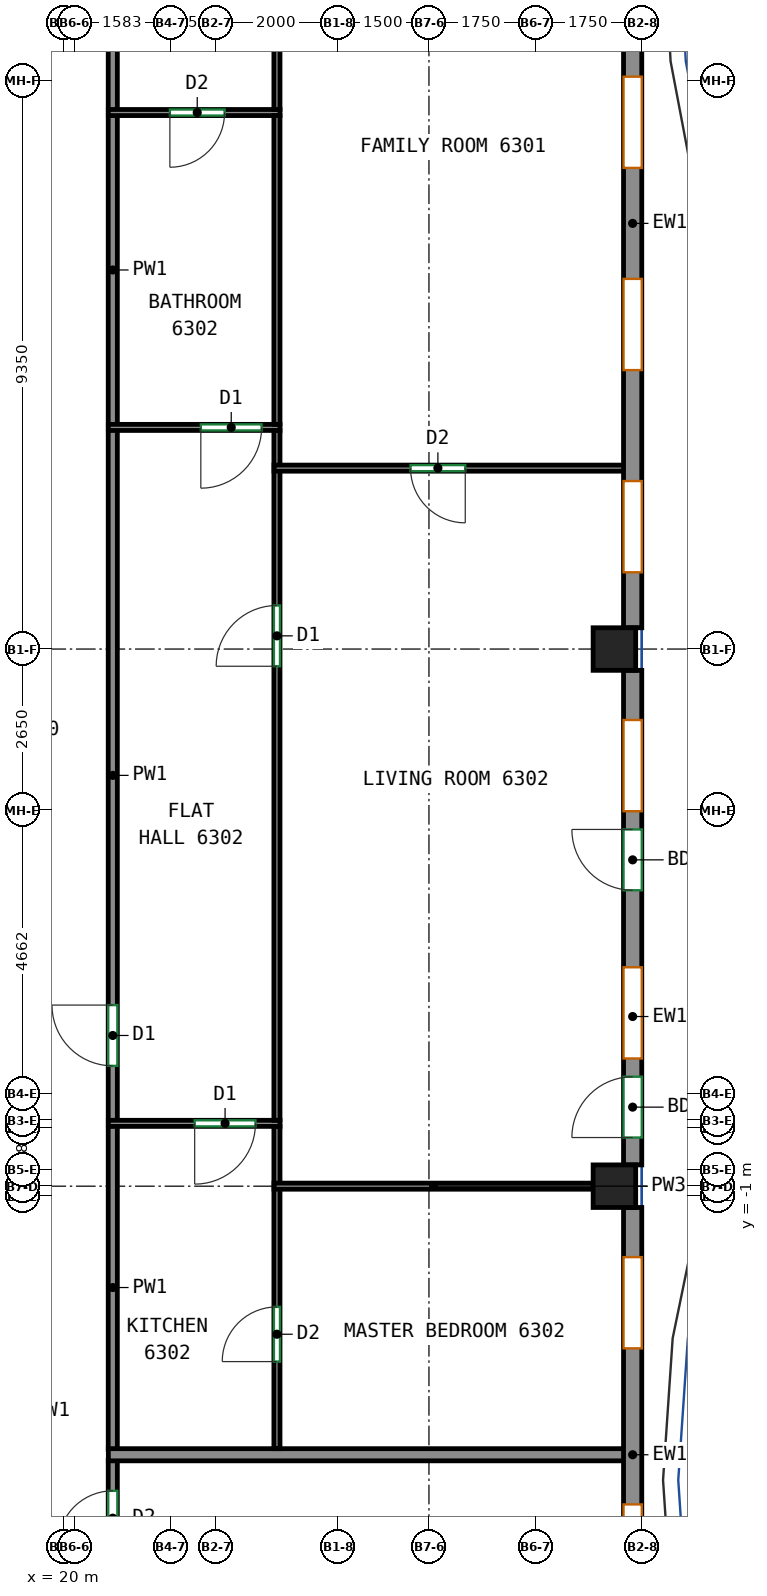
"""IFC4 building model, lengths in metres.
Left out: names, types, materials, properties, quantities, classifications, styles, units other than length and angle.
Written with IfcOpenShell. Run it as: python <this file> out.ifc"""

import sys

from ifc_helpers import new_model, si_unit, direction, frame, frame_2d, origin, origin_2d, place, context, subcontext, project, spatial, rectangle, extrude, source, transform, mapped, element, fill, save


model = new_model("IFC4")
c1 = context("Model", 3, precision=1e-05, world=origin(), true_north=direction((0.0, 1.0)))
c2 = subcontext(c1, "Body", "Model", "MODEL_VIEW")
j1 = project(units=[si_unit("LENGTHUNIT", "METRE"), si_unit("PLANEANGLEUNIT", "RADIAN")], contexts=[c1])
p1 = place(None, origin())
s1 = spatial("IfcSite", under=j1, at=p1, CompositionType="ELEMENT")
p2 = place(p1, origin())
s2 = spatial("IfcBuilding", under=s1, at=p2, CompositionType="ELEMENT")
p3 = place(p2, frame((0.0, 0.0, 259.4)))
s3 = spatial("IfcBuildingStorey", under=s2, at=p3, CompositionType="ELEMENT", Elevation=259.4)
m1 = source(origin(), c2, "Body", "SweptSolid", [
    extrude(rectangle(XDim=0.7, YDim=0.7, at=origin_2d()), origin(), (0.0, 0.0, 1.0), 3.0),
])
for number, where, z_axis, x_axis in (
    (1, (29.05, -0.833, 0.0), (0.0, 0.0, 1.0), (1.0, 0.0, 0.0)),
    (2, (29.05, 8.0, 0.0), (0.0, 0.0, 1.0), (1.0, 0.0, 0.0)),
):
    element("IfcColumn", number, at=place(p3, frame(where, z_axis=z_axis, x_axis=x_axis)), inside=s3, PredefinedType="COLUMN", context=c2, shape_type="MappedRepresentation", body=[
        mapped(m1, transform((0.0, 0.0, 0.0))),
    ])
m2 = source(origin(), c2, "Body", "SweptSolid", [
    extrude(rectangle(XDim=8.133, YDim=0.3, at=frame_2d((4.067, 0.0))), origin(), (0.0, 0.0, 1.0), 3.0),
])
p4 = place(p3, frame((29.35, -9.317, 0.0), z_axis=(0.0, 0.0, 1.0), x_axis=(0.0, 1.0, 0.0)))
e3 = element("IfcWall", 3, at=p4, inside=s3, PredefinedType="SOLIDWALL", context=c2, shape_type="MappedRepresentation", body=[
    mapped(m2, transform((0.0, 0.0, 0.0))),
])
p5 = place(p4, frame((1.75, 0.0, 0.8)))
e4 = element("IfcOpeningElement", 4, at=p5, cuts=e3, PredefinedType="OPENING", context=c2, shape_type="SweptSolid", body=[
    extrude(rectangle(XDim=1.5, YDim=2.05, at=frame_2d((0.75, 1.025))), frame((0.0, 0.16, 0.0), z_axis=(0.0, -1.0, 0.0), x_axis=(1.0, 0.0, 0.0)), (0.0, 0.0, 1.0), 0.32),
])
p6 = place(p4, frame((5.817, 0.0, 0.8)))
e5 = element("IfcOpeningElement", 5, at=p6, cuts=e3, PredefinedType="OPENING", context=c2, shape_type="SweptSolid", body=[
    extrude(rectangle(XDim=1.5, YDim=2.05, at=frame_2d((0.75, 1.025))), frame((0.0, 0.16, 0.0), z_axis=(0.0, -1.0, 0.0), x_axis=(1.0, 0.0, 0.0)), (0.0, 0.0, 1.0), 0.32),
])
p7 = place(p3, frame((29.35, -0.483, 0.0), z_axis=(0.0, 0.0, 1.0), x_axis=(0.0, 1.0, 0.0)))
e6 = element("IfcWall", 6, at=p7, inside=s3, PredefinedType="SOLIDWALL", context=c2, shape_type="MappedRepresentation", body=[
    mapped(m2, transform((0.0, 0.0, 0.0))),
])
p8 = place(p7, frame((1.75, 0.0, 0.8)))
e7 = element("IfcOpeningElement", 7, at=p8, cuts=e6, PredefinedType="OPENING", context=c2, shape_type="SweptSolid", body=[
    extrude(rectangle(XDim=1.5, YDim=2.05, at=frame_2d((0.75, 1.025))), frame((0.0, 0.16, 0.0), z_axis=(0.0, -1.0, 0.0), x_axis=(1.0, 0.0, 0.0)), (0.0, 0.0, 1.0), 0.32),
])
p9 = place(p7, frame((0.45, 0.0, 0.0)))
e8 = element("IfcOpeningElement", 8, at=p9, cuts=e6, PredefinedType="OPENING", context=c2, shape_type="SweptSolid", body=[
    extrude(rectangle(XDim=1.0, YDim=2.1, at=frame_2d((0.5, 1.05))), frame((0.0, 0.16, 0.0), z_axis=(0.0, -1.0, 0.0), x_axis=(1.0, 0.0, 0.0)), (0.0, 0.0, 1.0), 0.32),
])
p10 = place(p7, frame((5.817, 0.0, 0.8)))
e9 = element("IfcOpeningElement", 9, at=p10, cuts=e6, PredefinedType="OPENING", context=c2, shape_type="SweptSolid", body=[
    extrude(rectangle(XDim=1.5, YDim=2.05, at=frame_2d((0.75, 1.025))), frame((0.0, 0.16, 0.0), z_axis=(0.0, -1.0, 0.0), x_axis=(1.0, 0.0, 0.0)), (0.0, 0.0, 1.0), 0.32),
])
p11 = place(p7, frame((4.517, 0.0, 0.0)))
e10 = element("IfcOpeningElement", 10, at=p11, cuts=e6, PredefinedType="OPENING", context=c2, shape_type="SweptSolid", body=[
    extrude(rectangle(XDim=1.0, YDim=2.1, at=frame_2d((0.5, 1.05))), frame((0.0, 0.16, 0.0), z_axis=(0.0, -1.0, 0.0), x_axis=(1.0, 0.0, 0.0)), (0.0, 0.0, 1.0), 0.32),
])
m3 = source(origin(), c2, "Body", "SweptSolid", [
    extrude(rectangle(XDim=13.3, YDim=0.3, at=frame_2d((6.65, 0.0))), origin(), (0.0, 0.0, 1.0), 3.0),
])
p12 = place(p3, frame((29.35, 8.35, 0.0), z_axis=(0.0, 0.0, 1.0), x_axis=(0.0, 1.0, 0.0)))
e11 = element("IfcWall", 11, at=p12, inside=s3, PredefinedType="SOLIDWALL", context=c2, shape_type="MappedRepresentation", body=[
    mapped(m3, transform((0.0, 0.0, 0.0))),
])
p13 = place(p12, frame((0.913, 0.0, 0.8)))
e12 = element("IfcOpeningElement", 12, at=p13, cuts=e11, PredefinedType="OPENING", context=c2, shape_type="SweptSolid", body=[
    extrude(rectangle(XDim=1.5, YDim=2.05, at=frame_2d((0.75, 1.025))), frame((0.0, 0.16, 0.0), z_axis=(0.0, -1.0, 0.0), x_axis=(1.0, 0.0, 0.0)), (0.0, 0.0, 1.0), 0.32),
])
p14 = place(p12, frame((4.238, 0.0, 0.8)))
e13 = element("IfcOpeningElement", 13, at=p14, cuts=e11, PredefinedType="OPENING", context=c2, shape_type="SweptSolid", body=[
    extrude(rectangle(XDim=1.5, YDim=2.05, at=frame_2d((0.75, 1.025))), frame((0.0, 0.16, 0.0), z_axis=(0.0, -1.0, 0.0), x_axis=(1.0, 0.0, 0.0)), (0.0, 0.0, 1.0), 0.32),
])
p15 = place(p12, frame((7.562, 0.0, 0.8)))
e14 = element("IfcOpeningElement", 14, at=p15, cuts=e11, PredefinedType="OPENING", context=c2, shape_type="SweptSolid", body=[
    extrude(rectangle(XDim=1.5, YDim=2.05, at=frame_2d((0.75, 1.025))), frame((0.0, 0.16, 0.0), z_axis=(0.0, -1.0, 0.0), x_axis=(1.0, 0.0, 0.0)), (0.0, 0.0, 1.0), 0.32),
])
p16 = place(p12, frame((10.887, 0.0, 0.8)))
e15 = element("IfcOpeningElement", 15, at=p16, cuts=e11, PredefinedType="OPENING", context=c2, shape_type="SweptSolid", body=[
    extrude(rectangle(XDim=1.5, YDim=2.05, at=frame_2d((0.75, 1.025))), frame((0.0, 0.16, 0.0), z_axis=(0.0, -1.0, 0.0), x_axis=(1.0, 0.0, 0.0)), (0.0, 0.0, 1.0), 0.32),
])
p17 = place(p3, frame((20.8, -7.75, 0.0), z_axis=(0.0, 0.0, 1.0), x_axis=(0.0, 1.0, 0.0)))
e16 = element("IfcWall", 16, at=p17, inside=s3, PredefinedType="PARTITIONING", context=c2, shape_type="SweptSolid", body=[
    extrude(rectangle(XDim=2.41, YDim=0.15, at=frame_2d((1.205, 0.0))), origin(), (0.0, 0.0, 1.0), 3.0),
])
p18 = place(p17, frame((1.007, 0.0, 0.0)))
e17 = element("IfcOpeningElement", 17, at=p18, cuts=e16, PredefinedType="OPENING", context=c2, shape_type="SweptSolid", body=[
    extrude(rectangle(XDim=0.9, YDim=2.1, at=frame_2d((0.45, 1.05))), frame((0.0, 0.085, 0.0), z_axis=(0.0, -1.0, 0.0), x_axis=(1.0, 0.0, 0.0)), (0.0, 0.0, 1.0), 0.17),
])
p19 = place(p3, frame((20.8, -5.16, 0.0), z_axis=(0.0, 0.0, 1.0), x_axis=(0.0, 1.0, 0.0)))
e18 = element("IfcWall", 18, at=p19, inside=s3, PredefinedType="PARTITIONING", context=c2, shape_type="SweptSolid", body=[
    extrude(rectangle(XDim=5.32, YDim=0.15, at=frame_2d((2.66, 0.0))), origin(), (0.0, 0.0, 1.0), 3.0),
])
p20 = place(p3, frame((20.8, 0.24, 0.0), z_axis=(0.0, 0.0, 1.0), x_axis=(0.0, 1.0, 0.0)))
e19 = element("IfcWall", 19, at=p20, inside=s3, PredefinedType="PARTITIONING", context=c2, shape_type="SweptSolid", body=[
    extrude(rectangle(XDim=11.365, YDim=0.15, at=frame_2d((5.683, 0.0))), origin(), (0.0, 0.0, 1.0), 3.0),
])
p21 = place(p20, frame((0.905, 0.0, 0.0)))
e20 = element("IfcOpeningElement", 20, at=p21, cuts=e19, PredefinedType="OPENING", context=c2, shape_type="SweptSolid", body=[
    extrude(rectangle(XDim=1.0, YDim=2.1, at=frame_2d((0.5, 1.05))), frame((0.0, 0.085, 0.0), z_axis=(0.0, -1.0, 0.0), x_axis=(1.0, 0.0, 0.0)), (0.0, 0.0, 1.0), 0.17),
])
p22 = place(p3, frame((20.8, 11.685, 0.0), z_axis=(0.0, 0.0, 1.0), x_axis=(0.0, 1.0, 0.0)))
e21 = element("IfcWall", 21, at=p22, inside=s3, PredefinedType="PARTITIONING", context=c2, shape_type="SweptSolid", body=[
    extrude(rectangle(XDim=5.098, YDim=0.15, at=frame_2d((2.549, 0.0))), origin(), (0.0, 0.0, 1.0), 3.0),
])
p23 = place(p3, frame((20.8, 16.863, 0.0), z_axis=(0.0, 0.0, 1.0), x_axis=(0.0, 1.0, 0.0)))
e22 = element("IfcWall", 22, at=p23, inside=s3, PredefinedType="PARTITIONING", context=c2, shape_type="SweptSolid", body=[
    extrude(rectangle(XDim=5.047, YDim=0.15, at=frame_2d((2.523, 0.0))), origin(), (0.0, 0.0, 1.0), 3.0),
])
p24 = place(p3, frame((20.727, -5.25, 0.0), z_axis=(0.0, 0.0, 1.0), x_axis=(1.0, 0.0, 0.0)))
e23 = element("IfcWall", 23, at=p24, inside=s3, PredefinedType="PARTITIONING", context=c2, shape_type="SweptSolid", body=[
    extrude(rectangle(XDim=8.523, YDim=0.2, at=frame_2d((4.261, 0.0))), origin(), (0.0, 0.0, 1.0), 3.0),
])
p25 = place(p3, frame((23.55, 0.2, 0.0), z_axis=(0.0, 0.0, 1.0), x_axis=(-1.0, 0.0, 0.0)))
e24 = element("IfcWall", 24, at=p25, inside=s3, PredefinedType="PARTITIONING", context=c2, shape_type="SweptSolid", body=[
    extrude(rectangle(XDim=2.823, YDim=0.1, at=frame_2d((1.412, 0.0))), origin(), (0.0, 0.0, 1.0), 3.0),
])
p26 = place(p25, frame((0.403, 0.0, 0.0)))
e25 = element("IfcOpeningElement", 25, at=p26, cuts=e24, PredefinedType="OPENING", context=c2, shape_type="SweptSolid", body=[
    extrude(rectangle(XDim=1.0, YDim=2.1, at=frame_2d((0.5, 1.05))), frame((0.0, 0.06, 0.0), z_axis=(0.0, -1.0, 0.0), x_axis=(1.0, 0.0, 0.0)), (0.0, 0.0, 1.0), 0.12),
])
p27 = place(p3, frame((23.5, -5.15, 0.0), z_axis=(0.0, 0.0, 1.0), x_axis=(0.0, 1.0, 0.0)))
e26 = element("IfcWall", 26, at=p27, inside=s3, PredefinedType="PARTITIONING", context=c2, shape_type="SweptSolid", body=[
    extrude(rectangle(XDim=4.277, YDim=0.1, at=frame_2d((2.138, 0.0))), origin(), (0.0, 0.0, 1.0), 3.0),
])
p28 = place(p27, frame((1.432, 0.0, 0.0)))
e27 = element("IfcOpeningElement", 27, at=p28, cuts=e26, PredefinedType="OPENING", context=c2, shape_type="SweptSolid", body=[
    extrude(rectangle(XDim=0.9, YDim=2.1, at=frame_2d((0.45, 1.05))), frame((0.0, 0.06, 0.0), z_axis=(0.0, -1.0, 0.0), x_axis=(1.0, 0.0, 0.0)), (0.0, 0.0, 1.0), 0.12),
])
p29 = place(p3, frame((23.5, -0.793, 0.0), z_axis=(0.0, 0.0, 1.0), x_axis=(0.0, 1.0, 0.0)))
e28 = element("IfcWall", 28, at=p29, inside=s3, PredefinedType="PARTITIONING", context=c2, shape_type="SweptSolid", body=[
    extrude(rectangle(XDim=0.943, YDim=0.1, at=frame_2d((0.471, 0.0))), origin(), (0.0, 0.0, 1.0), 3.0),
])
p30 = place(p3, frame((23.55, 11.645, 0.0), z_axis=(0.0, 0.0, 1.0), x_axis=(-1.0, 0.0, 0.0)))
e29 = element("IfcWall", 29, at=p30, inside=s3, PredefinedType="PARTITIONING", context=c2, shape_type="SweptSolid", body=[
    extrude(rectangle(XDim=2.823, YDim=0.1, at=frame_2d((1.412, 0.0))), origin(), (0.0, 0.0, 1.0), 3.0),
])
p31 = place(p30, frame((0.302, 0.0, 0.0)))
e30 = element("IfcOpeningElement", 30, at=p31, cuts=e29, PredefinedType="OPENING", context=c2, shape_type="SweptSolid", body=[
    extrude(rectangle(XDim=1.0, YDim=2.1, at=frame_2d((0.5, 1.05))), frame((0.0, 0.06, 0.0), z_axis=(0.0, -1.0, 0.0), x_axis=(1.0, 0.0, 0.0)), (0.0, 0.0, 1.0), 0.12),
])
p32 = place(p3, frame((23.5, 0.25, 0.0), z_axis=(0.0, 0.0, 1.0), x_axis=(0.0, 1.0, 0.0)))
e31 = element("IfcWall", 31, at=p32, inside=s3, PredefinedType="PARTITIONING", context=c2, shape_type="SweptSolid", body=[
    extrude(rectangle(XDim=10.685, YDim=0.1, at=frame_2d((5.343, 0.0))), origin(), (0.0, 0.0, 1.0), 3.0),
])
p33 = place(p32, frame((7.467, 0.0, 0.0)))
e32 = element("IfcOpeningElement", 32, at=p33, cuts=e31, PredefinedType="OPENING", context=c2, shape_type="SweptSolid", body=[
    extrude(rectangle(XDim=1.0, YDim=2.1, at=frame_2d((0.5, 1.05))), frame((0.0, 0.06, 0.0), z_axis=(0.0, -1.0, 0.0), x_axis=(1.0, 0.0, 0.0)), (0.0, 0.0, 1.0), 0.12),
])
p34 = place(p3, frame((23.5, 11.015, 0.0), z_axis=(0.0, 0.0, 1.0), x_axis=(0.0, 1.0, 0.0)))
e33 = element("IfcWall", 33, at=p34, inside=s3, PredefinedType="PARTITIONING", context=c2, shape_type="SweptSolid", body=[
    extrude(rectangle(XDim=0.58, YDim=0.1, at=frame_2d((0.29, 0.0))), origin(), (0.0, 0.0, 1.0), 3.0),
])
p35 = place(p3, frame((23.55, 16.823, 0.0), z_axis=(0.0, 0.0, 1.0), x_axis=(-1.0, 0.0, 0.0)))
e34 = element("IfcWall", 34, at=p35, inside=s3, PredefinedType="PARTITIONING", context=c2, shape_type="SweptSolid", body=[
    extrude(rectangle(XDim=2.823, YDim=0.1, at=frame_2d((1.412, 0.0))), origin(), (0.0, 0.0, 1.0), 3.0),
])
p36 = place(p35, frame((0.911, 0.0, 0.0)))
e35 = element("IfcOpeningElement", 35, at=p36, cuts=e34, PredefinedType="OPENING", context=c2, shape_type="SweptSolid", body=[
    extrude(rectangle(XDim=0.9, YDim=2.1, at=frame_2d((0.45, 1.05))), frame((0.0, 0.06, 0.0), z_axis=(0.0, -1.0, 0.0), x_axis=(1.0, 0.0, 0.0)), (0.0, 0.0, 1.0), 0.12),
])
p37 = place(p3, frame((23.5, 11.695, 0.0), z_axis=(0.0, 0.0, 1.0), x_axis=(0.0, 1.0, 0.0)))
e36 = element("IfcWall", 36, at=p37, inside=s3, PredefinedType="PARTITIONING", context=c2, shape_type="SweptSolid", body=[
    extrude(rectangle(XDim=5.078, YDim=0.1, at=frame_2d((2.539, 0.0))), origin(), (0.0, 0.0, 1.0), 3.0),
])
p38 = place(p3, frame((23.5, 16.873, 0.0), z_axis=(0.0, 0.0, 1.0), x_axis=(0.0, 1.0, 0.0)))
e37 = element("IfcWall", 37, at=p38, inside=s3, PredefinedType="PARTITIONING", context=c2, shape_type="SweptSolid", body=[
    extrude(rectangle(XDim=5.027, YDim=0.1, at=frame_2d((2.513, 0.0))), origin(), (0.0, 0.0, 1.0), 3.0),
])
p39 = place(p3, frame((28.7, -0.833, 0.0), z_axis=(0.0, 0.0, 1.0), x_axis=(-1.0, 0.0, 0.0)))
e38 = element("IfcWall", 38, at=p39, inside=s3, PredefinedType="PARTITIONING", context=c2, shape_type="SweptSolid", body=[
    extrude(rectangle(XDim=5.248, YDim=0.1, at=frame_2d((2.624, 0.0))), origin(), (0.0, 0.0, 1.0), 2.45),
])
p40 = place(p3, frame((29.25, 10.975, 0.0), z_axis=(0.0, 0.0, 1.0), x_axis=(-1.0, 0.0, 0.0)))
e39 = element("IfcWall", 39, at=p40, inside=s3, PredefinedType="PARTITIONING", context=c2, shape_type="SweptSolid", body=[
    extrude(rectangle(XDim=5.798, YDim=0.1, at=frame_2d((2.899, 0.0))), origin(), (0.0, 0.0, 1.0), 3.0),
])
p41 = place(p40, frame((2.653, 0.0, 0.0)))
e40 = element("IfcOpeningElement", 40, at=p41, cuts=e39, PredefinedType="OPENING", context=c2, shape_type="SweptSolid", body=[
    extrude(rectangle(XDim=0.9, YDim=2.1, at=frame_2d((0.45, 1.05))), frame((0.0, 0.06, 0.0), z_axis=(0.0, -1.0, 0.0), x_axis=(1.0, 0.0, 0.0)), (0.0, 0.0, 1.0), 0.12),
])
p42 = place(p5, origin())
e41 = element("IfcWindow", 41, at=p42, inside=s3, PartitioningType="SINGLE_PANEL", PredefinedType="WINDOW", context=c2, shape_type="SweptSolid", body=[
    extrude(rectangle(XDim=1.5, YDim=2.05, at=frame_2d((0.75, 1.025))), frame((0.0, 0.03, 0.0), z_axis=(0.0, -1.0, 0.0), x_axis=(1.0, 0.0, 0.0)), (0.0, 0.0, 1.0), 0.06),
])
fill(e4, e41)
p43 = place(p6, origin())
e42 = element("IfcWindow", 42, at=p43, inside=s3, PartitioningType="SINGLE_PANEL", PredefinedType="WINDOW", context=c2, shape_type="SweptSolid", body=[
    extrude(rectangle(XDim=1.5, YDim=2.05, at=frame_2d((0.75, 1.025))), frame((0.0, 0.03, 0.0), z_axis=(0.0, -1.0, 0.0), x_axis=(1.0, 0.0, 0.0)), (0.0, 0.0, 1.0), 0.06),
])
fill(e5, e42)
p44 = place(p8, origin())
e43 = element("IfcWindow", 43, at=p44, inside=s3, PartitioningType="SINGLE_PANEL", PredefinedType="WINDOW", context=c2, shape_type="SweptSolid", body=[
    extrude(rectangle(XDim=1.5, YDim=2.05, at=frame_2d((0.75, 1.025))), frame((0.0, 0.03, 0.0), z_axis=(0.0, -1.0, 0.0), x_axis=(1.0, 0.0, 0.0)), (0.0, 0.0, 1.0), 0.06),
])
fill(e7, e43)
p45 = place(p9, origin())
e44 = element("IfcDoor", 44, at=p45, inside=s3, OperationType="SINGLE_SWING_LEFT", PredefinedType="DOOR", context=c2, shape_type="SweptSolid", body=[
    extrude(rectangle(XDim=1.0, YDim=2.1, at=frame_2d((0.5, 1.05))), frame((0.0, 0.025, 0.0), z_axis=(0.0, -1.0, 0.0), x_axis=(1.0, 0.0, 0.0)), (0.0, 0.0, 1.0), 0.05),
])
fill(e8, e44)
p46 = place(p10, origin())
e45 = element("IfcWindow", 45, at=p46, inside=s3, PartitioningType="SINGLE_PANEL", PredefinedType="WINDOW", context=c2, shape_type="SweptSolid", body=[
    extrude(rectangle(XDim=1.5, YDim=2.05, at=frame_2d((0.75, 1.025))), frame((0.0, 0.03, 0.0), z_axis=(0.0, -1.0, 0.0), x_axis=(1.0, 0.0, 0.0)), (0.0, 0.0, 1.0), 0.06),
])
fill(e9, e45)
p47 = place(p11, origin())
e46 = element("IfcDoor", 46, at=p47, inside=s3, OperationType="SINGLE_SWING_RIGHT", PredefinedType="DOOR", context=c2, shape_type="SweptSolid", body=[
    extrude(rectangle(XDim=1.0, YDim=2.1, at=frame_2d((0.5, 1.05))), frame((0.0, 0.025, 0.0), z_axis=(0.0, -1.0, 0.0), x_axis=(1.0, 0.0, 0.0)), (0.0, 0.0, 1.0), 0.05),
])
fill(e10, e46)
p48 = place(p13, origin())
e47 = element("IfcWindow", 47, at=p48, inside=s3, PartitioningType="SINGLE_PANEL", PredefinedType="WINDOW", context=c2, shape_type="SweptSolid", body=[
    extrude(rectangle(XDim=1.5, YDim=2.05, at=frame_2d((0.75, 1.025))), frame((0.0, 0.03, 0.0), z_axis=(0.0, -1.0, 0.0), x_axis=(1.0, 0.0, 0.0)), (0.0, 0.0, 1.0), 0.06),
])
fill(e12, e47)
p49 = place(p14, origin())
e48 = element("IfcWindow", 48, at=p49, inside=s3, PartitioningType="SINGLE_PANEL", PredefinedType="WINDOW", context=c2, shape_type="SweptSolid", body=[
    extrude(rectangle(XDim=1.5, YDim=2.05, at=frame_2d((0.75, 1.025))), frame((0.0, 0.03, 0.0), z_axis=(0.0, -1.0, 0.0), x_axis=(1.0, 0.0, 0.0)), (0.0, 0.0, 1.0), 0.06),
])
fill(e13, e48)
p50 = place(p15, origin())
e49 = element("IfcWindow", 49, at=p50, inside=s3, PartitioningType="SINGLE_PANEL", PredefinedType="WINDOW", context=c2, shape_type="SweptSolid", body=[
    extrude(rectangle(XDim=1.5, YDim=2.05, at=frame_2d((0.75, 1.025))), frame((0.0, 0.03, 0.0), z_axis=(0.0, -1.0, 0.0), x_axis=(1.0, 0.0, 0.0)), (0.0, 0.0, 1.0), 0.06),
])
fill(e14, e49)
p51 = place(p18, origin())
e50 = element("IfcDoor", 50, at=p51, inside=s3, OperationType="SINGLE_SWING_LEFT", PredefinedType="DOOR", context=c2, shape_type="SweptSolid", body=[
    extrude(rectangle(XDim=0.9, YDim=2.1, at=frame_2d((0.45, 1.05))), frame((0.0, 0.025, 0.0), z_axis=(0.0, -1.0, 0.0), x_axis=(1.0, 0.0, 0.0)), (0.0, 0.0, 1.0), 0.05),
])
fill(e17, e50)
p52 = place(p28, origin())
e51 = element("IfcDoor", 51, at=p52, inside=s3, OperationType="SINGLE_SWING_LEFT", PredefinedType="DOOR", context=c2, shape_type="SweptSolid", body=[
    extrude(rectangle(XDim=0.9, YDim=2.1, at=frame_2d((0.45, 1.05))), frame((0.0, 0.025, 0.0), z_axis=(0.0, -1.0, 0.0), x_axis=(1.0, 0.0, 0.0)), (0.0, 0.0, 1.0), 0.05),
])
fill(e27, e51)
p53 = place(p26, origin())
e52 = element("IfcDoor", 52, at=p53, inside=s3, OperationType="SINGLE_SWING_RIGHT", PredefinedType="DOOR", context=c2, shape_type="SweptSolid", body=[
    extrude(rectangle(XDim=1.0, YDim=2.1, at=frame_2d((0.5, 1.05))), frame((0.0, 0.025, 0.0), z_axis=(0.0, -1.0, 0.0), x_axis=(1.0, 0.0, 0.0)), (0.0, 0.0, 1.0), 0.05),
])
fill(e25, e52)
p54 = place(p21, origin())
e53 = element("IfcDoor", 53, at=p54, inside=s3, OperationType="SINGLE_SWING_RIGHT", PredefinedType="DOOR", context=c2, shape_type="SweptSolid", body=[
    extrude(rectangle(XDim=1.0, YDim=2.1, at=frame_2d((0.5, 1.05))), frame((0.0, 0.025, 0.0), z_axis=(0.0, -1.0, 0.0), x_axis=(1.0, 0.0, 0.0)), (0.0, 0.0, 1.0), 0.05),
])
fill(e20, e53)
p55 = place(p33, origin())
e54 = element("IfcDoor", 54, at=p55, inside=s3, OperationType="SINGLE_SWING_LEFT", PredefinedType="DOOR", context=c2, shape_type="SweptSolid", body=[
    extrude(rectangle(XDim=1.0, YDim=2.1, at=frame_2d((0.5, 1.05))), frame((0.0, 0.025, 0.0), z_axis=(0.0, -1.0, 0.0), x_axis=(1.0, 0.0, 0.0)), (0.0, 0.0, 1.0), 0.05),
])
fill(e32, e54)
p56 = place(p41, origin())
e55 = element("IfcDoor", 55, at=p56, inside=s3, OperationType="SINGLE_SWING_LEFT", PredefinedType="DOOR", context=c2, shape_type="SweptSolid", body=[
    extrude(rectangle(XDim=0.9, YDim=2.1, at=frame_2d((0.45, 1.05))), frame((0.0, 0.025, 0.0), z_axis=(0.0, -1.0, 0.0), x_axis=(1.0, 0.0, 0.0)), (0.0, 0.0, 1.0), 0.05),
])
fill(e40, e55)
p57 = place(p31, origin())
e56 = element("IfcDoor", 56, at=p57, inside=s3, OperationType="SINGLE_SWING_RIGHT", PredefinedType="DOOR", context=c2, shape_type="SweptSolid", body=[
    extrude(rectangle(XDim=1.0, YDim=2.1, at=frame_2d((0.5, 1.05))), frame((0.0, 0.025, 0.0), z_axis=(0.0, -1.0, 0.0), x_axis=(1.0, 0.0, 0.0)), (0.0, 0.0, 1.0), 0.05),
])
fill(e30, e56)
p58 = place(p36, origin())
e57 = element("IfcDoor", 57, at=p58, inside=s3, OperationType="SINGLE_SWING_RIGHT", PredefinedType="DOOR", context=c2, shape_type="SweptSolid", body=[
    extrude(rectangle(XDim=0.9, YDim=2.1, at=frame_2d((0.45, 1.05))), frame((0.0, 0.025, 0.0), z_axis=(0.0, -1.0, 0.0), x_axis=(1.0, 0.0, 0.0)), (0.0, 0.0, 1.0), 0.05),
])
fill(e35, e57)
save(model, sys.argv[1])
